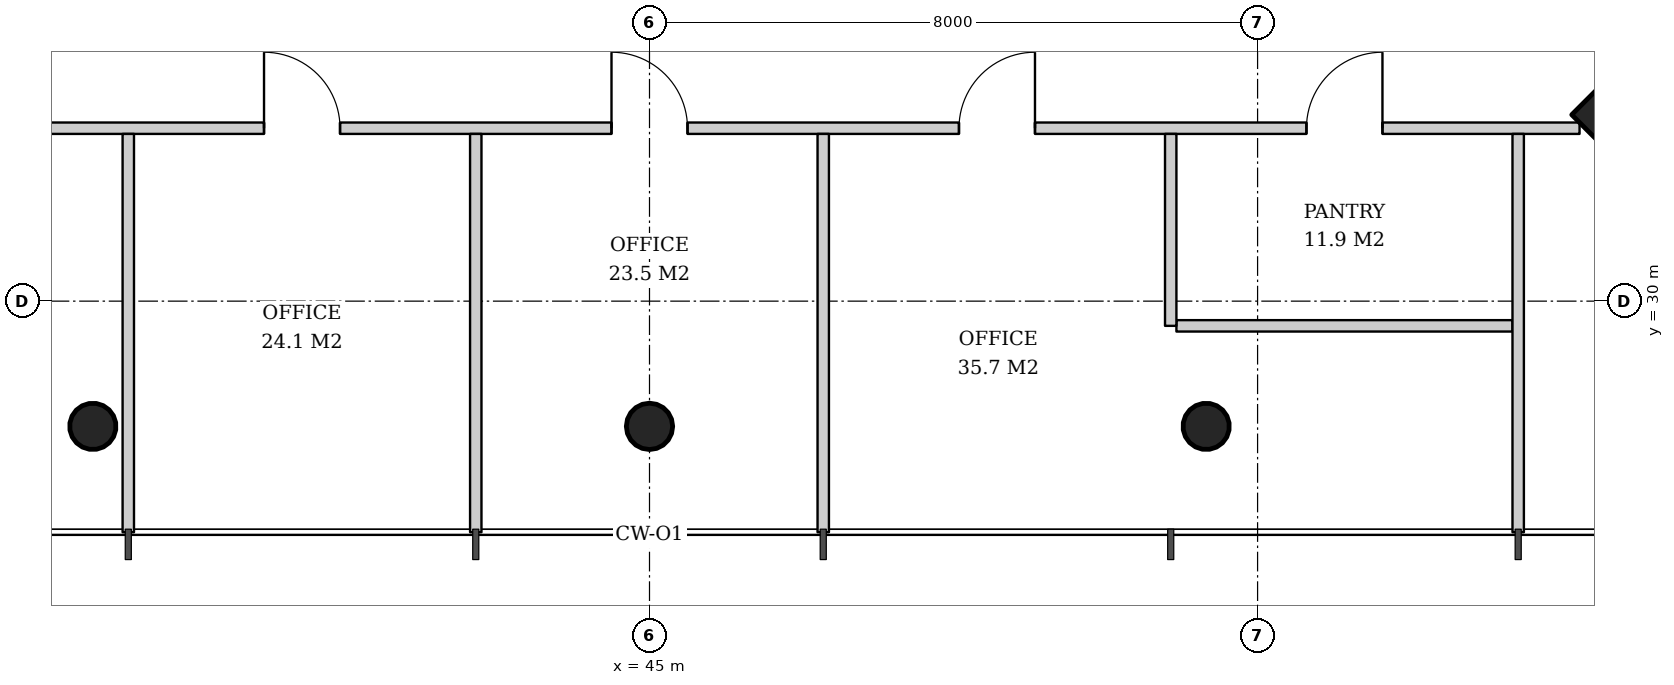
"""IFC4 building model, lengths in metres.
Left out: names, types, materials, properties, quantities, classifications, styles, units other than length and angle.
Written with IfcOpenShell. Run it as: python <this file> out.ifc"""

import sys

from ifc_helpers import new_model, si_unit, direction, frame, frame_2d, origin, origin_2d, place, context, subcontext, project, spatial, rectangle, hollow_circle, extrude, element, fill, save


model = new_model("IFC4")
c1 = context("Model", 3, precision=1e-05, world=origin(), true_north=direction((0.0, 1.0)))
c2 = subcontext(c1, "Body", "Model", "MODEL_VIEW")
j1 = project(units=[si_unit("LENGTHUNIT", "METRE"), si_unit("PLANEANGLEUNIT", "RADIAN")], contexts=[c1])
p1 = place(None, origin())
s1 = spatial("IfcSite", under=j1, at=p1, CompositionType="ELEMENT")
p2 = place(p1, origin())
s2 = spatial("IfcBuilding", under=s1, at=p2, CompositionType="ELEMENT")
p3 = place(p2, frame((0.0, 0.0, 218.6)))
s3 = spatial("IfcBuildingStorey", under=s2, at=p3, CompositionType="ELEMENT", Elevation=218.6)
p4 = place(p3, frame((58.586, 32.414, 0.0), z_axis=(-0.031900153262, 0.031900153262, 0.998981861919), x_axis=(-0.707106781187, -0.707106781187, 0.0)))
e1 = element("IfcColumn", 1, at=p4, inside=s3, PredefinedType="COLUMN", context=c2, shape_type="SweptSolid", body=[
    extrude(rectangle(XDim=2.0, YDim=2.0, at=origin_2d()), origin(), (0.0, 0.0, 1.0), 3.804),
])
p5 = place(p3, frame((37.657, 28.314, 0.0), z_axis=(0.015924037308, 0.031976494272, 0.99936176075), x_axis=(-0.895145027055, 0.445775033553, 0.0)))
e2 = element("IfcColumn", 2, at=p5, inside=s3, PredefinedType="COLUMN", context=c2, shape_type="SweptSolid", body=[
    extrude(hollow_circle(Radius=0.305, WallThickness=0.025, at=origin_2d()), origin(), (0.0, 0.0, 1.0), 3.802),
])
p6 = place(p3, frame((45.0, 28.314, 0.0), z_axis=(0.0, 0.031980549263, 0.999488491414), x_axis=(-1.0, 0.0, 0.0)))
e3 = element("IfcColumn", 3, at=p6, inside=s3, PredefinedType="COLUMN", context=c2, shape_type="SweptSolid", body=[
    extrude(hollow_circle(Radius=0.305, WallThickness=0.025, at=origin_2d()), origin(), (0.0, 0.0, 1.0), 3.802),
])
p7 = place(p3, frame((52.343, 28.314, 0.0), z_axis=(-0.015924037308, 0.031976494272, 0.99936176075), x_axis=(-0.895145027055, -0.445775033553, 0.0)))
e4 = element("IfcColumn", 4, at=p7, inside=s3, PredefinedType="COLUMN", context=c2, shape_type="SweptSolid", body=[
    extrude(hollow_circle(Radius=0.305, WallThickness=0.025, at=origin_2d()), origin(), (0.0, 0.0, 1.0), 3.802),
])
p8 = place(p3, frame((51.932, 29.675, 0.0), z_axis=(0.0, 0.0, 1.0), x_axis=(1.0, 0.0, 0.0)))
e5 = element("IfcWall", 5, at=p8, inside=s3, PredefinedType="PARTITIONING", context=c2, shape_type="SweptSolid", body=[
    extrude(rectangle(XDim=4.421, YDim=0.15, at=frame_2d((2.211, 0.0))), origin(), (0.0, 0.0, 1.0), 2.867),
])
p9 = place(p3, frame((32.764, 32.275, 0.0), z_axis=(0.0, 0.0, 1.0), x_axis=(1.0, 0.0, 0.0)))
e6 = element("IfcWall", 6, at=p9, inside=s3, PredefinedType="PARTITIONING", context=c2, shape_type="SweptSolid", body=[
    extrude(rectangle(XDim=24.472, YDim=0.15, at=frame_2d((12.236, 0.0))), origin(), (0.0, 0.0, 1.0), 2.867),
])
p10 = place(p9, frame((2.593, 0.0, 0.0)))
e7 = element("IfcOpeningElement", 7, at=p10, cuts=e6, PredefinedType="OPENING", context=c2, shape_type="SweptSolid", body=[
    extrude(rectangle(XDim=1.0, YDim=2.1, at=frame_2d((0.5, 1.05))), frame((0.0, 0.085, 0.0), z_axis=(0.0, -1.0, 0.0), x_axis=(1.0, 0.0, 0.0)), (0.0, 0.0, 1.0), 0.17),
])
p11 = place(p9, frame((7.164, 0.0, 0.0)))
e8 = element("IfcOpeningElement", 8, at=p11, cuts=e6, PredefinedType="OPENING", context=c2, shape_type="SweptSolid", body=[
    extrude(rectangle(XDim=1.0, YDim=2.1, at=frame_2d((0.5, 1.05))), frame((0.0, 0.085, 0.0), z_axis=(0.0, -1.0, 0.0), x_axis=(1.0, 0.0, 0.0)), (0.0, 0.0, 1.0), 0.17),
])
p12 = place(p9, frame((11.736, 0.0, 0.0)))
e9 = element("IfcOpeningElement", 9, at=p12, cuts=e6, PredefinedType="OPENING", context=c2, shape_type="SweptSolid", body=[
    extrude(rectangle(XDim=1.0, YDim=2.1, at=frame_2d((0.5, 1.05))), frame((0.0, 0.085, 0.0), z_axis=(0.0, -1.0, 0.0), x_axis=(1.0, 0.0, 0.0)), (0.0, 0.0, 1.0), 0.17),
])
p13 = place(p9, frame((16.307, 0.0, 0.0)))
e10 = element("IfcOpeningElement", 10, at=p13, cuts=e6, PredefinedType="OPENING", context=c2, shape_type="SweptSolid", body=[
    extrude(rectangle(XDim=1.0, YDim=2.1, at=frame_2d((0.5, 1.05))), frame((0.0, 0.085, 0.0), z_axis=(0.0, -1.0, 0.0), x_axis=(1.0, 0.0, 0.0)), (0.0, 0.0, 1.0), 0.17),
])
p14 = place(p9, frame((20.879, 0.0, 0.0)))
e11 = element("IfcOpeningElement", 11, at=p14, cuts=e6, PredefinedType="OPENING", context=c2, shape_type="SweptSolid", body=[
    extrude(rectangle(XDim=1.0, YDim=2.1, at=frame_2d((0.5, 1.05))), frame((0.0, 0.085, 0.0), z_axis=(0.0, -1.0, 0.0), x_axis=(1.0, 0.0, 0.0)), (0.0, 0.0, 1.0), 0.17),
])
for number, where, z_axis, x_axis in (
    (12, (38.143, 32.2, 0.0), (0.0, 0.0, 1.0), (0.0, -1.0, 0.0)),
    (13, (42.714, 32.2, 0.0), (0.0, 0.0, 1.0), (0.0, -1.0, 0.0)),
    (14, (47.286, 32.2, 0.0), (0.0, 0.0, 1.0), (0.0, -1.0, 0.0)),
):
    element("IfcWall", number, at=place(p3, frame(where, z_axis=z_axis, x_axis=x_axis)), inside=s3, PredefinedType="PARTITIONING", context=c2, shape_type="SweptSolid", body=[
        extrude(rectangle(XDim=5.24, YDim=0.15, at=frame_2d((2.62, 0.0))), origin(), (0.0, 0.0, 1.0), 3.12),
    ])
p15 = place(p3, frame((51.857, 32.2, 0.0), z_axis=(0.0, 0.0, 1.0), x_axis=(0.0, -1.0, 0.0)))
e15 = element("IfcWall", 15, at=p15, inside=s3, PredefinedType="PARTITIONING", context=c2, shape_type="SweptSolid", body=[
    extrude(rectangle(XDim=2.525, YDim=0.15, at=frame_2d((1.262, 0.0))), origin(), (0.0, 0.0, 1.0), 3.62),
])
p16 = place(p3, frame((56.428, 32.2, 0.0), z_axis=(0.0, 0.0, 1.0), x_axis=(0.0, -1.0, 0.0)))
e16 = element("IfcWall", 16, at=p16, inside=s3, PredefinedType="PARTITIONING", context=c2, shape_type="SweptSolid", body=[
    extrude(rectangle(XDim=5.24, YDim=0.15, at=frame_2d((2.62, 0.0))), origin(), (0.0, 0.0, 1.0), 3.12),
])
p17 = place(p11, origin())
e17 = element("IfcDoor", 17, at=p17, inside=s3, OperationType="SINGLE_SWING_LEFT", PredefinedType="DOOR", context=c2, shape_type="SweptSolid", body=[
    extrude(rectangle(XDim=1.0, YDim=2.1, at=frame_2d((0.5, 1.05))), frame((0.0, 0.025, 0.0), z_axis=(0.0, -1.0, 0.0), x_axis=(1.0, 0.0, 0.0)), (0.0, 0.0, 1.0), 0.05),
])
fill(e8, e17)
p18 = place(p12, origin())
e18 = element("IfcDoor", 18, at=p18, inside=s3, OperationType="SINGLE_SWING_LEFT", PredefinedType="DOOR", context=c2, shape_type="SweptSolid", body=[
    extrude(rectangle(XDim=1.0, YDim=2.1, at=frame_2d((0.5, 1.05))), frame((0.0, 0.025, 0.0), z_axis=(0.0, -1.0, 0.0), x_axis=(1.0, 0.0, 0.0)), (0.0, 0.0, 1.0), 0.05),
])
fill(e9, e18)
p19 = place(p13, origin())
e19 = element("IfcDoor", 19, at=p19, inside=s3, OperationType="SINGLE_SWING_RIGHT", PredefinedType="DOOR", context=c2, shape_type="SweptSolid", body=[
    extrude(rectangle(XDim=1.0, YDim=2.1, at=frame_2d((0.5, 1.05))), frame((0.0, 0.025, 0.0), z_axis=(0.0, -1.0, 0.0), x_axis=(1.0, 0.0, 0.0)), (0.0, 0.0, 1.0), 0.05),
])
fill(e10, e19)
p20 = place(p14, origin())
e20 = element("IfcDoor", 20, at=p20, inside=s3, OperationType="SINGLE_SWING_RIGHT", PredefinedType="DOOR", context=c2, shape_type="SweptSolid", body=[
    extrude(rectangle(XDim=1.0, YDim=2.1, at=frame_2d((0.5, 1.05))), frame((0.0, 0.025, 0.0), z_axis=(0.0, -1.0, 0.0), x_axis=(1.0, 0.0, 0.0)), (0.0, 0.0, 1.0), 0.05),
])
fill(e11, e20)
save(model, sys.argv[1])
